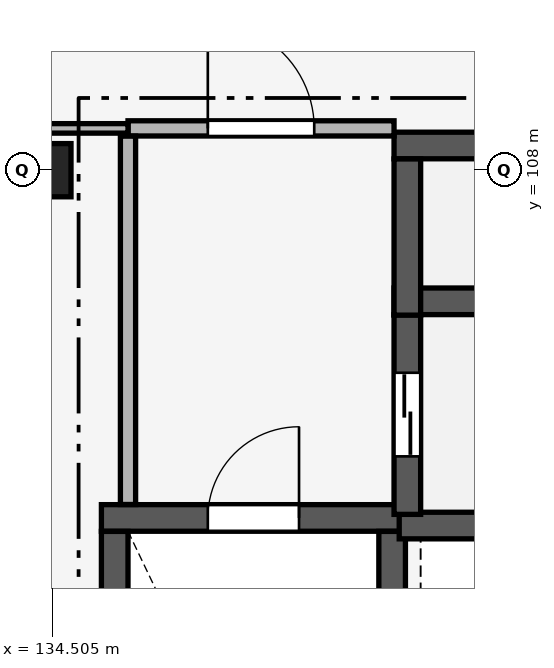
"""IFC4 building model, lengths in metres.
Left out: names, types, materials, properties, quantities, classifications, styles, units other than length and angle.
Written with IfcOpenShell. Run it as: python <this file> out.ifc"""

import sys

from ifc_helpers import new_model, si_unit, direction, frame, frame_2d, origin, origin_2d, place, context, subcontext, project, spatial, rectangle, extrude, element, fill, save


model = new_model("IFC4")
c1 = context("Model", 3, precision=1e-05, world=origin(), true_north=direction((0.0, 1.0)))
c2 = subcontext(c1, "Body", "Model", "MODEL_VIEW")
j1 = project(units=[si_unit("LENGTHUNIT", "METRE"), si_unit("PLANEANGLEUNIT", "RADIAN")], contexts=[c1])
p1 = place(None, origin())
s1 = spatial("IfcSite", under=j1, at=p1, CompositionType="ELEMENT")
p2 = place(p1, origin())
s2 = spatial("IfcBuilding", under=s1, at=p2, CompositionType="ELEMENT")
p3 = place(p2, frame((0.0, 0.0, 29.4)))
s3 = spatial("IfcBuildingStorey", under=s2, at=p3, CompositionType="ELEMENT", Elevation=29.4)
p4 = place(p3, frame((134.4, 108.0, 0.0), z_axis=(0.0, 0.0, 1.0), x_axis=(1.0, 0.0, 0.0)))
e1 = element("IfcColumn", 1, at=p4, inside=s3, PredefinedType="COLUMN", context=c2, shape_type="SweptSolid", body=[
    extrude(rectangle(XDim=0.7, YDim=0.7, at=origin_2d()), origin(), (0.0, 0.0, 1.0), 4.2),
])
p5 = place(p3, frame((135.15, 103.425, 0.0), z_axis=(0.0, 0.0, 1.0), x_axis=(1.0, 0.0, 0.0)))
e2 = element("IfcWall", 2, at=p5, inside=s3, PredefinedType="SHEAR", context=c2, shape_type="SweptSolid", body=[
    extrude(rectangle(XDim=4.0, YDim=0.35, at=frame_2d((2.0, 0.0))), origin(), (0.0, 0.0, 1.0), 3.95),
])
p6 = place(p5, frame((1.4, 0.0, 0.0)))
e3 = element("IfcOpeningElement", 3, at=p6, cuts=e2, PredefinedType="OPENING", context=c2, shape_type="SweptSolid", body=[
    extrude(rectangle(XDim=1.2, YDim=2.2, at=frame_2d((0.6, 1.1))), frame((0.0, 0.19, 0.0), z_axis=(0.0, -1.0, 0.0), x_axis=(1.0, 0.0, 0.0)), (0.0, 0.0, 1.0), 0.38),
])
for number, where, z_axis, x_axis in (
    (4, (135.325, 96.352, 0.0), (0.0, 0.0, 1.0), (0.0, 1.0, 0.0)),
    (5, (138.975, 96.352, 0.0), (0.0, 0.0, 1.0), (0.0, 1.0, 0.0)),
):
    element("IfcWall", number, at=place(p3, frame(where, z_axis=z_axis, x_axis=x_axis)), inside=s3, PredefinedType="SHEAR", context=c2, shape_type="SweptSolid", body=[
        extrude(rectangle(XDim=6.896, YDim=0.35, at=frame_2d((3.448, 0.0))), origin(), (0.0, 0.0, 1.0), 3.95),
    ])
p7 = place(p3, frame((139.068, 103.325, 0.0), z_axis=(0.0, 0.0, 1.0), x_axis=(1.0, 0.0, 0.0)))
e6 = element("IfcWall", 6, at=p7, inside=s3, PredefinedType="SHEAR", context=c2, shape_type="SweptSolid", body=[
    extrude(rectangle(XDim=3.032, YDim=0.35, at=frame_2d((1.516, 0.0))), origin(), (0.0, 0.0, 1.0), 3.95),
])
p8 = place(p3, frame((139.0, 106.275, 0.0), z_axis=(0.0, 0.0, 1.0), x_axis=(1.0, 0.0, 0.0)))
e7 = element("IfcWall", 7, at=p8, inside=s3, PredefinedType="SHEAR", context=c2, shape_type="SweptSolid", body=[
    extrude(rectangle(XDim=3.1, YDim=0.35, at=frame_2d((1.55, 0.0))), origin(), (0.0, 0.0, 1.0), 3.95),
])
p9 = place(p3, frame((139.175, 103.472, 0.0), z_axis=(0.0, 0.0, 1.0), x_axis=(0.0, 1.0, 0.0)))
e8 = element("IfcWall", 8, at=p9, inside=s3, PredefinedType="SHEAR", context=c2, shape_type="SweptSolid", body=[
    extrude(rectangle(XDim=2.626, YDim=0.35, at=frame_2d((1.313, 0.0))), origin(), (0.0, 0.0, 1.0), 3.95),
])
p10 = place(p9, frame((0.763, 0.0, 0.0)))
e9 = element("IfcOpeningElement", 9, at=p10, cuts=e8, PredefinedType="OPENING", context=c2, shape_type="SweptSolid", body=[
    extrude(rectangle(XDim=1.1, YDim=2.15, at=frame_2d((0.55, 1.075))), frame((0.0, 0.19, 0.0), z_axis=(0.0, -1.0, 0.0), x_axis=(1.0, 0.0, 0.0)), (0.0, 0.0, 1.0), 0.38),
])
p11 = place(p3, frame((139.0, 108.325, 0.0), z_axis=(0.0, 0.0, 1.0), x_axis=(1.0, 0.0, 0.0)))
e10 = element("IfcWall", 10, at=p11, inside=s3, PredefinedType="SHEAR", context=c2, shape_type="SweptSolid", body=[
    extrude(rectangle(XDim=3.455, YDim=0.35, at=frame_2d((1.728, 0.0))), origin(), (0.0, 0.0, 1.0), 3.95),
])
p12 = place(p11, frame((1.178, 0.0, 0.0)))
e11 = element("IfcOpeningElement", 11, at=p12, cuts=e10, PredefinedType="OPENING", context=c2, shape_type="SweptSolid", body=[
    extrude(rectangle(XDim=1.1, YDim=2.15, at=frame_2d((0.55, 1.075))), frame((0.0, 0.19, 0.0), z_axis=(0.0, -1.0, 0.0), x_axis=(1.0, 0.0, 0.0)), (0.0, 0.0, 1.0), 0.38),
])
p13 = place(p3, frame((139.175, 106.093, 0.0), z_axis=(0.0, 0.0, 1.0), x_axis=(0.0, 1.0, 0.0)))
e12 = element("IfcWall", 12, at=p13, inside=s3, PredefinedType="SHEAR", context=c2, shape_type="SweptSolid", body=[
    extrude(rectangle(XDim=2.055, YDim=0.35, at=frame_2d((1.027, 0.0))), origin(), (0.0, 0.0, 1.0), 3.95),
])
p14 = place(p3, frame((135.5, 108.55, 0.0), z_axis=(0.0, 0.0, 1.0), x_axis=(1.0, 0.0, 0.0)))
e13 = element("IfcWall", 13, at=p14, inside=s3, PredefinedType="PARTITIONING", context=c2, shape_type="SweptSolid", body=[
    extrude(rectangle(XDim=3.5, YDim=0.2, at=frame_2d((1.75, 0.0))), origin(), (0.0, 0.0, 1.0), 3.95),
])
p15 = place(p14, frame((1.05, 0.0, 0.0)))
e14 = element("IfcOpeningElement", 14, at=p15, cuts=e13, PredefinedType="OPENING", context=c2, shape_type="SweptSolid", body=[
    extrude(rectangle(XDim=1.4, YDim=2.2, at=frame_2d((0.7, 1.1))), frame((0.0, 0.115, 0.0), z_axis=(0.0, -1.0, 0.0), x_axis=(1.0, 0.0, 0.0)), (0.0, 0.0, 1.0), 0.23),
])
p16 = place(p3, frame((134.23, 108.55, 0.0), z_axis=(0.0, 0.0, 1.0), x_axis=(1.0, 0.0, 0.0)))
e15 = element("IfcWall", 15, at=p16, inside=s3, PredefinedType="PARTITIONING", context=c2, shape_type="SweptSolid", body=[
    extrude(rectangle(XDim=1.27, YDim=0.125, at=frame_2d((0.635, 0.0))), origin(), (0.0, 0.0, 1.0), 3.4),
])
p17 = place(p3, frame((135.5, 103.602, 0.0), z_axis=(0.0, 0.0, 1.0), x_axis=(0.0, 1.0, 0.0)))
e16 = element("IfcWall", 16, at=p17, inside=s3, PredefinedType="PARTITIONING", context=c2, shape_type="SweptSolid", body=[
    extrude(rectangle(XDim=4.846, YDim=0.2, at=frame_2d((2.423, 0.0))), origin(), (0.0, 0.0, 1.0), 3.95),
])
p18 = place(p6, origin())
e17 = element("IfcDoor", 17, at=p18, inside=s3, OperationType="SINGLE_SWING_RIGHT", PredefinedType="DOOR", context=c2, shape_type="SweptSolid", body=[
    extrude(rectangle(XDim=1.2, YDim=2.2, at=frame_2d((0.6, 1.1))), frame((0.0, 0.025, 0.0), z_axis=(0.0, -1.0, 0.0), x_axis=(1.0, 0.0, 0.0)), (0.0, 0.0, 1.0), 0.05),
])
fill(e3, e17)
p19 = place(p10, origin())
e18 = element("IfcDoor", 18, at=p19, inside=s3, OperationType="DOUBLE_DOOR_SLIDING", PredefinedType="DOOR", context=c2, shape_type="SweptSolid", body=[
    extrude(rectangle(XDim=1.1, YDim=2.15, at=frame_2d((0.55, 1.075))), frame((0.0, 0.025, 0.0), z_axis=(0.0, -1.0, 0.0), x_axis=(1.0, 0.0, 0.0)), (0.0, 0.0, 1.0), 0.05),
])
fill(e9, e18)
p20 = place(p15, origin())
e19 = element("IfcDoor", 19, at=p20, inside=s3, OperationType="SINGLE_SWING_LEFT", PredefinedType="DOOR", context=c2, shape_type="SweptSolid", body=[
    extrude(rectangle(XDim=1.4, YDim=2.2, at=frame_2d((0.7, 1.1))), frame((0.0, 0.025, 0.0), z_axis=(0.0, -1.0, 0.0), x_axis=(1.0, 0.0, 0.0)), (0.0, 0.0, 1.0), 0.05),
])
fill(e14, e19)
save(model, sys.argv[1])
